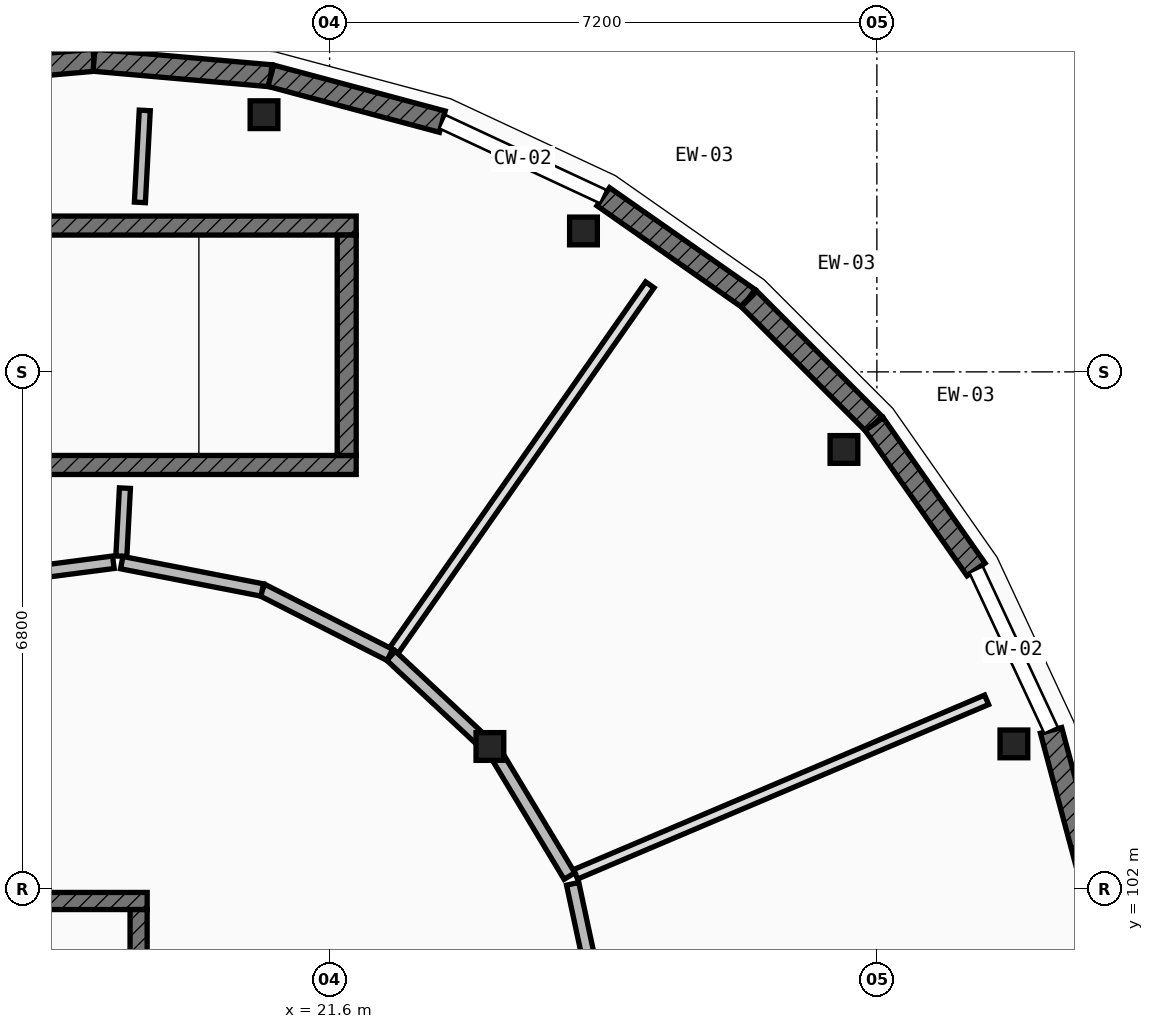
"""IFC4 building model, lengths in metres.
Left out: names, types, materials, properties, quantities, classifications, styles, units other than length and angle.
Written with IfcOpenShell. Run it as: python <this file> out.ifc"""

import sys

from ifc_helpers import new_model, si_unit, direction, frame, frame_2d, origin, origin_2d, place, context, subcontext, project, spatial, rectangle, extrude, element, fill, save


model = new_model("IFC4")
c1 = context("Model", 3, precision=1e-05, world=origin(), true_north=direction((0.0, 1.0)))
c2 = subcontext(c1, "Body", "Model", "MODEL_VIEW")
j1 = project(units=[si_unit("LENGTHUNIT", "METRE"), si_unit("PLANEANGLEUNIT", "RADIAN")], contexts=[c1])
p1 = place(None, origin())
s1 = spatial("IfcSite", under=j1, at=p1, CompositionType="ELEMENT")
p2 = place(p1, origin())
s2 = spatial("IfcBuilding", under=s1, at=p2, CompositionType="ELEMENT")
p3 = place(p2, frame((0.0, 0.0, 8.75)))
s3 = spatial("IfcBuildingStorey", under=s2, at=p3, CompositionType="ELEMENT", Elevation=8.75)
for number, where, z_axis, x_axis in (
    (1, (30.603, 103.905, 0.0), (0.0, 0.0, 1.0), (1.0, 0.0, 0.0)),
    (2, (28.367, 107.779, 0.0), (0.0, 0.0, 1.0), (1.0, 0.0, 0.0)),
    (3, (24.94, 110.654, 0.0), (0.0, 0.0, 1.0), (1.0, 0.0, 0.0)),
    (4, (20.737, 112.184, 0.0), (0.0, 0.0, 1.0), (1.0, 0.0, 0.0)),
    (5, (23.709, 103.871, 0.0), (0.0, 0.0, 1.0), (1.0, 0.0, 0.0)),
):
    element("IfcColumn", number, at=place(p3, frame(where, z_axis=z_axis, x_axis=x_axis)), inside=s3, PredefinedType="COLUMN", context=c2, shape_type="SweptSolid", body=[
        extrude(rectangle(XDim=0.365, YDim=0.365, at=origin_2d()), origin(), (0.0, 0.0, 1.0), 4.2),
    ])
for number, where, z_axis, x_axis in (
    (6, (16.173, 112.696, 0.0), (0.0, 0.0, 1.0), (0.996, 0.087, 0.0)),
    (7, (18.5, 112.9, 0.0), (0.0, 0.0, 1.0), (0.996, -0.087, 0.0)),
):
    element("IfcWall", number, at=place(p3, frame(where, z_axis=z_axis, x_axis=x_axis)), inside=s3, PredefinedType="ELEMENTEDWALL", context=c2, shape_type="SweptSolid", body=[
        extrude(rectangle(XDim=2.336, YDim=0.29, at=frame_2d((1.168, 0.0))), origin(), (0.0, 0.0, 1.0), 3.329),
    ])
p4 = place(p3, frame((20.827, 112.696, 0.0), z_axis=(0.0, 0.0, 1.0), x_axis=(0.965981166673, -0.258612423585, 0.0)))
e8 = element("IfcWall", 8, at=p4, inside=s3, PredefinedType="ELEMENTEDWALL", context=c2, shape_type="SweptSolid", body=[
    extrude(rectangle(XDim=2.335, YDim=0.29, at=frame_2d((1.168, 0.0))), origin(), (0.0, 0.0, 1.0), 3.329),
])
p5 = place(p4, frame((0.693, 0.0, 0.85)))
e9 = element("IfcOpeningElement", 9, at=p5, cuts=e8, PredefinedType="OPENING", context=c2, shape_type="SweptSolid", body=[
    extrude(rectangle(XDim=0.95, YDim=1.6, at=frame_2d((0.475, 0.8))), frame((0.0, 0.155, 0.0), z_axis=(0.0, -1.0, 0.0), x_axis=(1.0, 0.0, 0.0)), (0.0, 0.0, 1.0), 0.31),
])
p6 = place(p3, frame((25.2, 111.105, 0.0), z_axis=(0.0, 0.0, 1.0), x_axis=(0.819045278347, -0.573728883722, 0.0)))
e10 = element("IfcWall", 10, at=p6, inside=s3, PredefinedType="ELEMENTEDWALL", context=c2, shape_type="SweptSolid", body=[
    extrude(rectangle(XDim=2.336, YDim=0.29, at=frame_2d((1.168, 0.0))), origin(), (0.0, 0.0, 1.0), 3.329),
])
p7 = place(p6, frame((0.693, 0.0, 0.85)))
e11 = element("IfcOpeningElement", 11, at=p7, cuts=e10, PredefinedType="OPENING", context=c2, shape_type="SweptSolid", body=[
    extrude(rectangle(XDim=0.95, YDim=1.8, at=frame_2d((0.475, 0.9))), frame((0.0, 0.155, 0.0), z_axis=(0.0, -1.0, 0.0), x_axis=(1.0, 0.0, 0.0)), (0.0, 0.0, 1.0), 0.31),
])
p8 = place(p3, frame((27.113, 109.765, 0.0), z_axis=(0.0, 0.0, 1.0), x_axis=(0.707106781187, -0.707106781187, 0.0)))
e12 = element("IfcWall", 12, at=p8, inside=s3, PredefinedType="ELEMENTEDWALL", context=c2, shape_type="SweptSolid", body=[
    extrude(rectangle(XDim=2.336, YDim=0.29, at=frame_2d((1.168, 0.0))), origin(), (0.0, 0.0, 1.0), 3.329),
])
p9 = place(p8, frame((0.693, 0.0, 0.85)))
e13 = element("IfcOpeningElement", 13, at=p9, cuts=e12, PredefinedType="OPENING", context=c2, shape_type="SweptSolid", body=[
    extrude(rectangle(XDim=0.95, YDim=2.05, at=frame_2d((0.475, 1.025))), frame((0.0, 0.155, 0.0), z_axis=(0.0, -1.0, 0.0), x_axis=(1.0, 0.0, 0.0)), (0.0, 0.0, 1.0), 0.31),
])
p10 = place(p3, frame((28.765, 108.113, 0.0), z_axis=(0.0, 0.0, 1.0), x_axis=(0.573728883722, -0.819045278347, 0.0)))
e14 = element("IfcWall", 14, at=p10, inside=s3, PredefinedType="ELEMENTEDWALL", context=c2, shape_type="SweptSolid", body=[
    extrude(rectangle(XDim=2.336, YDim=0.29, at=frame_2d((1.168, 0.0))), origin(), (0.0, 0.0, 1.0), 3.329),
])
p11 = place(p10, frame((0.678, 0.0, 0.85)))
e15 = element("IfcOpeningElement", 15, at=p11, cuts=e14, PredefinedType="OPENING", context=c2, shape_type="SweptSolid", body=[
    extrude(rectangle(XDim=0.98, YDim=1.5, at=frame_2d((0.49, 0.75))), frame((0.0, 0.155, 0.0), z_axis=(0.0, -1.0, 0.0), x_axis=(1.0, 0.0, 0.0)), (0.0, 0.0, 1.0), 0.31),
])
p12 = place(p3, frame((31.092, 104.083, 0.0), z_axis=(0.0, 0.0, 1.0), x_axis=(0.258612423585, -0.965981166673, 0.0)))
e16 = element("IfcWall", 16, at=p12, inside=s3, PredefinedType="ELEMENTEDWALL", context=c2, shape_type="SweptSolid", body=[
    extrude(rectangle(XDim=2.335, YDim=0.29, at=frame_2d((1.168, 0.0))), origin(), (0.0, 0.0, 1.0), 3.329),
])
p13 = place(p12, frame((0.678, 0.0, 0.85)))
e17 = element("IfcOpeningElement", 17, at=p13, cuts=e16, PredefinedType="OPENING", context=c2, shape_type="SweptSolid", body=[
    extrude(rectangle(XDim=0.98, YDim=1.75, at=frame_2d((0.49, 0.875))), frame((0.0, 0.155, 0.0), z_axis=(0.0, -1.0, 0.0), x_axis=(1.0, 0.0, 0.0)), (0.0, 0.0, 1.0), 0.31),
])
p14 = place(p3, frame((15.05, 107.575, 0.0), z_axis=(0.0, 0.0, 1.0), x_axis=(1.0, 0.0, 0.0)))
e18 = element("IfcWall", 18, at=p14, inside=s3, PredefinedType="SHEAR", context=c2, shape_type="SweptSolid", body=[
    extrude(rectangle(XDim=6.9, YDim=0.25, at=frame_2d((3.45, 0.0))), origin(), (0.0, 0.0, 1.0), 3.975),
])
p15 = place(p14, frame((0.43, 0.0, 0.0)))
e19 = element("IfcOpeningElement", 19, at=p15, cuts=e18, PredefinedType="OPENING", context=c2, shape_type="SweptSolid", body=[
    extrude(rectangle(XDim=1.1, YDim=2.15, at=frame_2d((0.55, 1.075))), frame((0.0, 0.135, 0.0), z_axis=(0.0, -1.0, 0.0), x_axis=(1.0, 0.0, 0.0)), (0.0, 0.0, 1.0), 0.27),
])
p16 = place(p3, frame((15.05, 110.725, 0.0), z_axis=(0.0, 0.0, 1.0), x_axis=(1.0, 0.0, 0.0)))
e20 = element("IfcWall", 20, at=p16, inside=s3, PredefinedType="SHEAR", context=c2, shape_type="SweptSolid", body=[
    extrude(rectangle(XDim=6.9, YDim=0.25, at=frame_2d((3.45, 0.0))), origin(), (0.0, 0.0, 1.0), 3.975),
])
p17 = place(p3, frame((21.825, 107.7, 0.0), z_axis=(0.0, 0.0, 1.0), x_axis=(0.0, 1.0, 0.0)))
e21 = element("IfcWall", 21, at=p17, inside=s3, PredefinedType="SHEAR", context=c2, shape_type="SweptSolid", body=[
    extrude(rectangle(XDim=2.9, YDim=0.25, at=frame_2d((1.45, 0.0))), origin(), (0.0, 0.0, 1.0), 3.975),
])
p18 = place(p3, frame((16.1, 101.838, 0.0), z_axis=(0.0, 0.0, 1.0), x_axis=(1.0, 0.0, 0.0)))
e22 = element("IfcWall", 22, at=p18, inside=s3, PredefinedType="SHEAR", context=c2, shape_type="SweptSolid", body=[
    extrude(rectangle(XDim=3.1, YDim=0.225, at=frame_2d((1.55, 0.0))), origin(), (0.0, 0.0, 1.0), 3.975),
])
p19 = place(p3, frame((19.087, 99.575, 0.0), z_axis=(0.0, 0.0, 1.0), x_axis=(0.0, 1.0, 0.0)))
e23 = element("IfcWall", 23, at=p19, inside=s3, PredefinedType="SHEAR", context=c2, shape_type="SweptSolid", body=[
    extrude(rectangle(XDim=2.15, YDim=0.225, at=frame_2d((1.075, 0.0))), origin(), (0.0, 0.0, 1.0), 3.975),
])
p20 = place(p3, frame((18.86, 106.374, 0.0), z_axis=(0.0, 0.0, 1.0), x_axis=(0.052244629109, 0.998634316819, 0.0)))
e24 = element("IfcWall", 24, at=p20, inside=s3, PredefinedType="PARTITIONING", context=c2, shape_type="SweptSolid", body=[
    extrude(rectangle(XDim=0.897, YDim=0.145, at=frame_2d((0.449, 0.0))), origin(), (0.0, 0.0, 1.0), 3.304),
])
p21 = place(p3, frame((19.104, 111.03, 0.0), z_axis=(0.0, 0.0, 1.0), x_axis=(0.05279149634, 0.998605556721, 0.0)))
e25 = element("IfcWall", 25, at=p21, inside=s3, PredefinedType="PARTITIONING", context=c2, shape_type="SweptSolid", body=[
    extrude(rectangle(XDim=1.212, YDim=0.145, at=frame_2d((0.606, 0.0))), origin(), (0.0, 0.0, 1.0), 3.304),
])
p22 = place(p3, frame((24.836, 102.189, 0.0), z_axis=(0.0, 0.0, 1.0), x_axis=(0.920468107404, 0.390817685438, 0.0)))
e26 = element("IfcWall", 26, at=p22, inside=s3, PredefinedType="PLUMBINGWALL", context=c2, shape_type="SweptSolid", body=[
    extrude(rectangle(XDim=5.875, YDim=0.135, at=frame_2d((2.938, 0.0))), origin(), (0.0, 0.0, 1.0), 3.304),
])
p23 = place(p3, frame((22.448, 105.138, 0.0), z_axis=(0.0, 0.0, 1.0), x_axis=(0.573462344363, 0.819231920519, 0.0)))
e27 = element("IfcWall", 27, at=p23, inside=s3, PredefinedType="PLUMBINGWALL", context=c2, shape_type="SweptSolid", body=[
    extrude(rectangle(XDim=5.868, YDim=0.135, at=frame_2d((2.934, 0.0))), origin(), (0.0, 0.0, 1.0), 3.304),
])
p24 = place(p3, frame((18.755, 106.295, 0.0), z_axis=(0.0, 0.0, 1.0), x_axis=(-0.991634012436, -0.129081313054, 0.0)))
e28 = element("IfcWall", 28, at=p24, inside=s3, PredefinedType="PARTITIONING", context=c2, shape_type="SweptSolid", body=[
    extrude(rectangle(XDim=1.417, YDim=0.165, at=frame_2d((0.708, 0.0))), origin(), (0.0, 0.0, 1.0), 3.304),
])
p25 = place(p24, frame((0.258, 0.0, 0.0)))
e29 = element("IfcOpeningElement", 29, at=p25, cuts=e28, PredefinedType="OPENING", context=c2, shape_type="SweptSolid", body=[
    extrude(rectangle(XDim=0.9, YDim=2.1, at=frame_2d((0.45, 1.05))), frame((0.0, 0.093, 0.0), z_axis=(0.0, -1.0, 0.0), x_axis=(1.0, 0.0, 0.0)), (0.0, 0.0, 1.0), 0.185),
])
p26 = place(p3, frame((25.296, 99.737, 0.0), z_axis=(0.0, 0.0, 1.0), x_axis=(-0.209199758456, 0.977872926848, 0.0)))
e30 = element("IfcWall", 30, at=p26, inside=s3, PredefinedType="PARTITIONING", context=c2, shape_type="SweptSolid", body=[
    extrude(rectangle(XDim=2.38, YDim=0.165, at=frame_2d((1.19, 0.0))), origin(), (0.0, 0.0, 1.0), 3.304),
])
p27 = place(p3, frame((24.756, 102.166, 0.0), z_axis=(0.0, 0.0, 1.0), x_axis=(-0.515979321691, 0.85660103875, 0.0)))
e31 = element("IfcWall", 31, at=p27, inside=s3, PredefinedType="PARTITIONING", context=c2, shape_type="SweptSolid", body=[
    extrude(rectangle(XDim=1.814, YDim=0.165, at=frame_2d((0.907, 0.0))), origin(), (0.0, 0.0, 1.0), 3.304),
])
p28 = place(p27, frame((0.437, 0.0, 0.0)))
e32 = element("IfcOpeningElement", 32, at=p28, cuts=e31, PredefinedType="OPENING", context=c2, shape_type="SweptSolid", body=[
    extrude(rectangle(XDim=0.94, YDim=2.1, at=frame_2d((0.47, 1.05))), frame((0.0, 0.093, 0.0), z_axis=(0.0, -1.0, 0.0), x_axis=(1.0, 0.0, 0.0)), (0.0, 0.0, 1.0), 0.185),
])
p29 = place(p3, frame((23.562, 103.987, 0.0), z_axis=(0.0, 0.0, 1.0), x_axis=(-0.730813584636, 0.682577105176, 0.0)))
e33 = element("IfcWall", 33, at=p29, inside=s3, PredefinedType="PARTITIONING", context=c2, shape_type="SweptSolid", body=[
    extrude(rectangle(XDim=1.579, YDim=0.165, at=frame_2d((0.79, 0.0))), origin(), (0.0, 0.0, 1.0), 3.304),
])
p30 = place(p3, frame((22.393, 105.076, 0.0), z_axis=(0.0, 0.0, 1.0), x_axis=(-0.891321219161, 0.453372346172, 0.0)))
e34 = element("IfcWall", 34, at=p30, inside=s3, PredefinedType="PARTITIONING", context=c2, shape_type="SweptSolid", body=[
    extrude(rectangle(XDim=1.884, YDim=0.165, at=frame_2d((0.942, 0.0))), origin(), (0.0, 0.0, 1.0), 3.304),
])
p31 = place(p30, frame((0.452, 0.0, 0.0)))
e35 = element("IfcOpeningElement", 35, at=p31, cuts=e34, PredefinedType="OPENING", context=c2, shape_type="SweptSolid", body=[
    extrude(rectangle(XDim=0.98, YDim=2.1, at=frame_2d((0.49, 1.05))), frame((0.0, 0.093, 0.0), z_axis=(0.0, -1.0, 0.0), x_axis=(1.0, 0.0, 0.0)), (0.0, 0.0, 1.0), 0.185),
])
p32 = place(p3, frame((20.714, 105.93, 0.0), z_axis=(0.0, 0.0, 1.0), x_axis=(-0.981560041322, 0.191154087794, 0.0)))
e36 = element("IfcWall", 36, at=p32, inside=s3, PredefinedType="PARTITIONING", context=c2, shape_type="SweptSolid", body=[
    extrude(rectangle(XDim=1.884, YDim=0.165, at=frame_2d((0.942, 0.0))), origin(), (0.0, 0.0, 1.0), 3.304),
])
p33 = place(p5, origin())
e37 = element("IfcWindow", 37, at=p33, inside=s3, PartitioningType="SINGLE_PANEL", PredefinedType="WINDOW", context=c2, shape_type="SweptSolid", body=[
    extrude(rectangle(XDim=0.95, YDim=1.6, at=frame_2d((0.475, 0.8))), frame((0.0, 0.03, 0.0), z_axis=(0.0, -1.0, 0.0), x_axis=(1.0, 0.0, 0.0)), (0.0, 0.0, 1.0), 0.06),
])
fill(e9, e37)
p34 = place(p7, origin())
e38 = element("IfcWindow", 38, at=p34, inside=s3, PartitioningType="SINGLE_PANEL", PredefinedType="WINDOW", context=c2, shape_type="SweptSolid", body=[
    extrude(rectangle(XDim=0.95, YDim=1.8, at=frame_2d((0.475, 0.9))), frame((0.0, 0.03, 0.0), z_axis=(0.0, -1.0, 0.0), x_axis=(1.0, 0.0, 0.0)), (0.0, 0.0, 1.0), 0.06),
])
fill(e11, e38)
p35 = place(p9, origin())
e39 = element("IfcWindow", 39, at=p35, inside=s3, PartitioningType="SINGLE_PANEL", PredefinedType="WINDOW", context=c2, shape_type="SweptSolid", body=[
    extrude(rectangle(XDim=0.95, YDim=2.05, at=frame_2d((0.475, 1.025))), frame((0.0, 0.03, 0.0), z_axis=(0.0, -1.0, 0.0), x_axis=(1.0, 0.0, 0.0)), (0.0, 0.0, 1.0), 0.06),
])
fill(e13, e39)
p36 = place(p11, origin())
e40 = element("IfcWindow", 40, at=p36, inside=s3, PartitioningType="SINGLE_PANEL", PredefinedType="WINDOW", context=c2, shape_type="SweptSolid", body=[
    extrude(rectangle(XDim=0.98, YDim=1.5, at=frame_2d((0.49, 0.75))), frame((0.0, 0.03, 0.0), z_axis=(0.0, -1.0, 0.0), x_axis=(1.0, 0.0, 0.0)), (0.0, 0.0, 1.0), 0.06),
])
fill(e15, e40)
p37 = place(p13, origin())
e41 = element("IfcWindow", 41, at=p37, inside=s3, PartitioningType="SINGLE_PANEL", PredefinedType="WINDOW", context=c2, shape_type="SweptSolid", body=[
    extrude(rectangle(XDim=0.98, YDim=1.75, at=frame_2d((0.49, 0.875))), frame((0.0, 0.03, 0.0), z_axis=(0.0, -1.0, 0.0), x_axis=(1.0, 0.0, 0.0)), (0.0, 0.0, 1.0), 0.06),
])
fill(e17, e41)
p38 = place(p25, origin())
e42 = element("IfcDoor", 42, at=p38, inside=s3, OperationType="SINGLE_SWING_RIGHT", PredefinedType="DOOR", context=c2, shape_type="SweptSolid", body=[
    extrude(rectangle(XDim=0.9, YDim=2.1, at=frame_2d((0.45, 1.05))), frame((0.0, 0.025, 0.0), z_axis=(0.0, -1.0, 0.0), x_axis=(1.0, 0.0, 0.0)), (0.0, 0.0, 1.0), 0.05),
])
fill(e29, e42)
p39 = place(p28, origin())
e43 = element("IfcDoor", 43, at=p39, inside=s3, OperationType="SINGLE_SWING_LEFT", PredefinedType="DOOR", context=c2, shape_type="SweptSolid", body=[
    extrude(rectangle(XDim=0.94, YDim=2.1, at=frame_2d((0.47, 1.05))), frame((0.0, 0.025, 0.0), z_axis=(0.0, -1.0, 0.0), x_axis=(1.0, 0.0, 0.0)), (0.0, 0.0, 1.0), 0.05),
])
fill(e32, e43)
p40 = place(p31, origin())
e44 = element("IfcDoor", 44, at=p40, inside=s3, OperationType="SINGLE_SWING_RIGHT", PredefinedType="DOOR", context=c2, shape_type="SweptSolid", body=[
    extrude(rectangle(XDim=0.98, YDim=2.1, at=frame_2d((0.49, 1.05))), frame((0.0, 0.025, 0.0), z_axis=(0.0, -1.0, 0.0), x_axis=(1.0, 0.0, 0.0)), (0.0, 0.0, 1.0), 0.05),
])
fill(e35, e44)
save(model, sys.argv[1])
